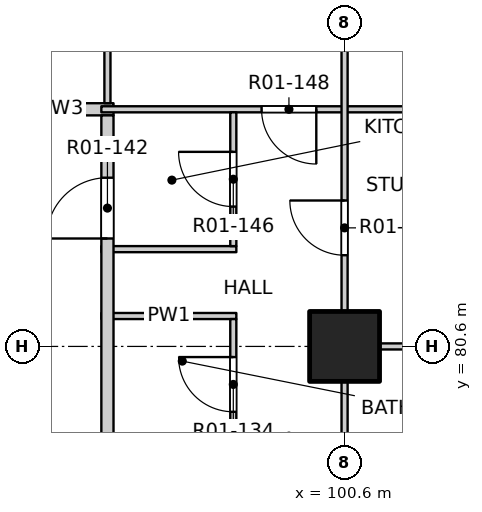
"""IFC4 building model, lengths in metres.
Left out: names, types, materials, properties, quantities, classifications, styles, units other than length and angle.
Written with IfcOpenShell. Run it as: python <this file> out.ifc"""

import sys

from ifc_helpers import new_model, si_unit, direction, frame, frame_2d, origin, origin_2d, place, context, subcontext, project, spatial, rectangle, extrude, element, fill, save


model = new_model("IFC4")
c1 = context("Model", 3, precision=1e-05, world=origin(), true_north=direction((0.0, 1.0)))
c2 = subcontext(c1, "Body", "Model", "MODEL_VIEW")
j1 = project(units=[si_unit("LENGTHUNIT", "METRE"), si_unit("PLANEANGLEUNIT", "RADIAN")], contexts=[c1])
p1 = place(None, origin())
s1 = spatial("IfcSite", under=j1, at=p1, CompositionType="ELEMENT")
p2 = place(p1, origin())
s2 = spatial("IfcBuilding", under=s1, at=p2, CompositionType="ELEMENT")
p3 = place(p2, frame((0.0, 0.0, 26.3)))
s3 = spatial("IfcBuildingStorey", under=s2, at=p3, CompositionType="ELEMENT", Elevation=26.3)
p4 = place(p3, frame((100.6, 80.6, -0.25), z_axis=(0.0, 0.0, 1.0), x_axis=(1.0, 0.0, 0.0)))
e1 = element("IfcColumn", 1, at=p4, inside=s3, PredefinedType="COLUMN", context=c2, shape_type="SweptSolid", body=[
    extrude(rectangle(XDim=1.15, YDim=1.15, at=origin_2d()), origin(), (0.0, 0.0, 1.0), 3.4),
])
p5 = place(p3, frame((100.55, 80.6, 0.0), z_axis=(0.0, 0.0, 1.0), x_axis=(1.0, 0.0, 0.0)))
e2 = element("IfcWall", 2, at=p5, inside=s3, PredefinedType="PARTITIONING", context=c2, shape_type="SweptSolid", body=[
    extrude(rectangle(XDim=7.55, YDim=0.1, at=frame_2d((3.775, 0.0))), origin(), (0.0, 0.0, 1.0), 2.55),
])
for number, where, z_axis, x_axis in (
    (3, (96.6, 81.1, 0.0), (0.0, 0.0, 1.0), (1.0, 0.0, 0.0)),
    (4, (96.6, 82.2, 0.0), (0.0, 0.0, 1.0), (1.0, 0.0, 0.0)),
):
    element("IfcWall", number, at=place(p3, frame(where, z_axis=z_axis, x_axis=x_axis)), inside=s3, PredefinedType="PARTITIONING", context=c2, shape_type="SweptSolid", body=[
        extrude(rectangle(XDim=2.22, YDim=0.1, at=frame_2d((1.11, 0.0))), origin(), (0.0, 0.0, 1.0), 3.15),
    ])
p6 = place(p3, frame((95.1, 84.5, 0.0), z_axis=(0.0, 0.0, 1.0), x_axis=(1.0, 0.0, 0.0)))
e5 = element("IfcWall", 5, at=p6, inside=s3, PredefinedType="PARTITIONING", context=c2, shape_type="SweptSolid", body=[
    extrude(rectangle(XDim=1.7, YDim=0.2, at=frame_2d((0.85, 0.0))), origin(), (0.0, 0.0, 1.0), 3.15),
])
p7 = place(p3, frame((96.6, 84.5, 0.0), z_axis=(0.0, 0.0, 1.0), x_axis=(1.0, 0.0, 0.0)))
e6 = element("IfcWall", 6, at=p7, inside=s3, PredefinedType="PARTITIONING", context=c2, shape_type="SweptSolid", body=[
    extrude(rectangle(XDim=11.5, YDim=0.1, at=frame_2d((5.75, 0.0))), origin(), (0.0, 0.0, 1.0), 3.15),
])
p8 = place(p7, frame((2.635, 0.0, 0.0)))
e7 = element("IfcOpeningElement", 7, at=p8, cuts=e6, PredefinedType="OPENING", context=c2, shape_type="SweptSolid", body=[
    extrude(rectangle(XDim=0.9, YDim=2.1, at=frame_2d((0.45, 1.05))), frame((0.0, 0.06, 0.0), z_axis=(0.0, -1.0, 0.0), x_axis=(1.0, 0.0, 0.0)), (0.0, 0.0, 1.0), 0.12),
])
p9 = place(p3, frame((96.7, 53.4, 0.0), z_axis=(0.0, 0.0, 1.0), x_axis=(0.0, 1.0, 0.0)))
e8 = element("IfcWall", 8, at=p9, inside=s3, PredefinedType="PARTITIONING", context=c2, shape_type="SweptSolid", body=[
    extrude(rectangle(XDim=31.0, YDim=0.2, at=frame_2d((15.5, 0.0))), origin(), (0.0, 0.0, 1.0), 3.15),
])
p10 = place(p9, frame((5.575, 0.0, 0.0)))
e9 = element("IfcOpeningElement", 9, at=p10, cuts=e8, PredefinedType="OPENING", context=c2, shape_type="SweptSolid", body=[
    extrude(rectangle(XDim=1.0, YDim=2.1, at=frame_2d((0.5, 1.05))), frame((0.0, 0.11, 0.0), z_axis=(0.0, -1.0, 0.0), x_axis=(1.0, 0.0, 0.0)), (0.0, 0.0, 1.0), 0.22),
])
p11 = place(p9, frame((10.075, 0.0, 0.0)))
e10 = element("IfcOpeningElement", 10, at=p11, cuts=e8, PredefinedType="OPENING", context=c2, shape_type="SweptSolid", body=[
    extrude(rectangle(XDim=1.0, YDim=2.1, at=frame_2d((0.5, 1.05))), frame((0.0, 0.11, 0.0), z_axis=(0.0, -1.0, 0.0), x_axis=(1.0, 0.0, 0.0)), (0.0, 0.0, 1.0), 0.22),
])
p12 = place(p9, frame((28.975, 0.0, 0.0)))
e11 = element("IfcOpeningElement", 11, at=p12, cuts=e8, PredefinedType="OPENING", context=c2, shape_type="SweptSolid", body=[
    extrude(rectangle(XDim=1.0, YDim=2.1, at=frame_2d((0.5, 1.05))), frame((0.0, 0.11, 0.0), z_axis=(0.0, -1.0, 0.0), x_axis=(1.0, 0.0, 0.0)), (0.0, 0.0, 1.0), 0.22),
])
p13 = place(p3, frame((96.7, 84.6, 0.0), z_axis=(0.0, 0.0, 1.0), x_axis=(0.0, 1.0, 0.0)))
e12 = element("IfcWall", 12, at=p13, inside=s3, PredefinedType="PARTITIONING", context=c2, shape_type="SweptSolid", body=[
    extrude(rectangle(XDim=3.5, YDim=0.1, at=frame_2d((1.75, 0.0))), origin(), (0.0, 0.0, 1.0), 3.15),
])
p14 = place(p13, frame((1.4, 0.0, 0.0)))
e13 = element("IfcOpeningElement", 13, at=p14, cuts=e12, PredefinedType="OPENING", context=c2, shape_type="SweptSolid", body=[
    extrude(rectangle(XDim=0.9, YDim=2.1, at=frame_2d((0.45, 1.05))), frame((0.0, 0.06, 0.0), z_axis=(0.0, -1.0, 0.0), x_axis=(1.0, 0.0, 0.0)), (0.0, 0.0, 1.0), 0.12),
])
p15 = place(p3, frame((98.77, 63.35, 0.0), z_axis=(0.0, 0.0, 1.0), x_axis=(0.0, 1.0, 0.0)))
e14 = element("IfcWall", 14, at=p15, inside=s3, PredefinedType="PARTITIONING", context=c2, shape_type="SweptSolid", body=[
    extrude(rectangle(XDim=17.7, YDim=0.1, at=frame_2d((8.85, 0.0))), origin(), (0.0, 0.0, 1.0), 3.15),
])
p16 = place(p15, frame((1.0, 0.0, 0.0)))
e15 = element("IfcOpeningElement", 15, at=p16, cuts=e14, PredefinedType="OPENING", context=c2, shape_type="SweptSolid", body=[
    extrude(rectangle(XDim=0.8, YDim=2.1, at=frame_2d((0.4, 1.05))), frame((0.0, 0.06, 0.0), z_axis=(0.0, -1.0, 0.0), x_axis=(1.0, 0.0, 0.0)), (0.0, 0.0, 1.0), 0.12),
])
p17 = place(p15, frame((3.9, 0.0, 0.0)))
e16 = element("IfcOpeningElement", 16, at=p17, cuts=e14, PredefinedType="OPENING", context=c2, shape_type="SweptSolid", body=[
    extrude(rectangle(XDim=0.8, YDim=2.1, at=frame_2d((0.4, 1.05))), frame((0.0, 0.06, 0.0), z_axis=(0.0, -1.0, 0.0), x_axis=(1.0, 0.0, 0.0)), (0.0, 0.0, 1.0), 0.12),
])
p18 = place(p15, frame((6.5, 0.0, 0.0)))
e17 = element("IfcOpeningElement", 17, at=p18, cuts=e14, PredefinedType="OPENING", context=c2, shape_type="SweptSolid", body=[
    extrude(rectangle(XDim=0.9, YDim=2.1, at=frame_2d((0.45, 1.05))), frame((0.0, 0.06, 0.0), z_axis=(0.0, -1.0, 0.0), x_axis=(1.0, 0.0, 0.0)), (0.0, 0.0, 1.0), 0.12),
])
p19 = place(p15, frame((9.385, 0.0, 0.0)))
e18 = element("IfcOpeningElement", 18, at=p19, cuts=e14, PredefinedType="OPENING", context=c2, shape_type="SweptSolid", body=[
    extrude(rectangle(XDim=0.9, YDim=2.1, at=frame_2d((0.45, 1.05))), frame((0.0, 0.06, 0.0), z_axis=(0.0, -1.0, 0.0), x_axis=(1.0, 0.0, 0.0)), (0.0, 0.0, 1.0), 0.12),
])
p20 = place(p15, frame((11.985, 0.0, 0.0)))
e19 = element("IfcOpeningElement", 19, at=p20, cuts=e14, PredefinedType="OPENING", context=c2, shape_type="SweptSolid", body=[
    extrude(rectangle(XDim=0.9, YDim=2.1, at=frame_2d((0.45, 1.05))), frame((0.0, 0.06, 0.0), z_axis=(0.0, -1.0, 0.0), x_axis=(1.0, 0.0, 0.0)), (0.0, 0.0, 1.0), 0.12),
])
p21 = place(p15, frame((14.025, 0.0, 0.0)))
e20 = element("IfcOpeningElement", 20, at=p21, cuts=e14, PredefinedType="OPENING", context=c2, shape_type="SweptSolid", body=[
    extrude(rectangle(XDim=0.8, YDim=2.1, at=frame_2d((0.4, 1.05))), frame((0.0, 0.06, 0.0), z_axis=(0.0, -1.0, 0.0), x_axis=(1.0, 0.0, 0.0)), (0.0, 0.0, 1.0), 0.12),
])
p22 = place(p15, frame((16.175, 0.0, 0.0)))
e21 = element("IfcOpeningElement", 21, at=p22, cuts=e14, PredefinedType="OPENING", context=c2, shape_type="SweptSolid", body=[
    extrude(rectangle(XDim=0.9, YDim=2.1, at=frame_2d((0.45, 1.05))), frame((0.0, 0.06, 0.0), z_axis=(0.0, -1.0, 0.0), x_axis=(1.0, 0.0, 0.0)), (0.0, 0.0, 1.0), 0.12),
])
p23 = place(p3, frame((98.77, 82.25, 0.0), z_axis=(0.0, 0.0, 1.0), x_axis=(0.0, 1.0, 0.0)))
e22 = element("IfcWall", 22, at=p23, inside=s3, PredefinedType="PARTITIONING", context=c2, shape_type="SweptSolid", body=[
    extrude(rectangle(XDim=2.2, YDim=0.1, at=frame_2d((1.1, 0.0))), origin(), (0.0, 0.0, 1.0), 3.15),
])
p24 = place(p23, frame((0.65, 0.0, 0.0)))
e23 = element("IfcOpeningElement", 23, at=p24, cuts=e22, PredefinedType="OPENING", context=c2, shape_type="SweptSolid", body=[
    extrude(rectangle(XDim=0.9, YDim=2.1, at=frame_2d((0.45, 1.05))), frame((0.0, 0.06, 0.0), z_axis=(0.0, -1.0, 0.0), x_axis=(1.0, 0.0, 0.0)), (0.0, 0.0, 1.0), 0.12),
])
p25 = place(p3, frame((100.6, 49.4, 0.0), z_axis=(0.0, 0.0, 1.0), x_axis=(0.0, 1.0, 0.0)))
e24 = element("IfcWall", 24, at=p25, inside=s3, PredefinedType="PARTITIONING", context=c2, shape_type="SweptSolid", body=[
    extrude(rectangle(XDim=31.2, YDim=0.1, at=frame_2d((15.6, 0.0))), origin(), (0.0, 0.0, 1.0), 3.15),
])
p26 = place(p25, frame((1.5, 0.0, 0.0)))
e25 = element("IfcOpeningElement", 25, at=p26, cuts=e24, PredefinedType="OPENING", context=c2, shape_type="SweptSolid", body=[
    extrude(rectangle(XDim=0.9, YDim=2.1, at=frame_2d((0.45, 1.05))), frame((0.0, 0.06, 0.0), z_axis=(0.0, -1.0, 0.0), x_axis=(1.0, 0.0, 0.0)), (0.0, 0.0, 1.0), 0.12),
])
p27 = place(p25, frame((5.4, 0.0, 0.0)))
e26 = element("IfcOpeningElement", 26, at=p27, cuts=e24, PredefinedType="OPENING", context=c2, shape_type="SweptSolid", body=[
    extrude(rectangle(XDim=0.9, YDim=2.1, at=frame_2d((0.45, 1.05))), frame((0.0, 0.06, 0.0), z_axis=(0.0, -1.0, 0.0), x_axis=(1.0, 0.0, 0.0)), (0.0, 0.0, 1.0), 0.12),
])
p28 = place(p25, frame((10.275, 0.0, 0.0)))
e27 = element("IfcOpeningElement", 27, at=p28, cuts=e24, PredefinedType="OPENING", context=c2, shape_type="SweptSolid", body=[
    extrude(rectangle(XDim=0.9, YDim=2.1, at=frame_2d((0.45, 1.05))), frame((0.0, 0.06, 0.0), z_axis=(0.0, -1.0, 0.0), x_axis=(1.0, 0.0, 0.0)), (0.0, 0.0, 1.0), 0.12),
])
p29 = place(p25, frame((14.0, 0.0, 0.0)))
e28 = element("IfcOpeningElement", 28, at=p29, cuts=e24, PredefinedType="OPENING", context=c2, shape_type="SweptSolid", body=[
    extrude(rectangle(XDim=0.9, YDim=2.1, at=frame_2d((0.45, 1.05))), frame((0.0, 0.06, 0.0), z_axis=(0.0, -1.0, 0.0), x_axis=(1.0, 0.0, 0.0)), (0.0, 0.0, 1.0), 0.12),
])
p30 = place(p25, frame((17.1, 0.0, 0.0)))
e29 = element("IfcOpeningElement", 29, at=p30, cuts=e24, PredefinedType="OPENING", context=c2, shape_type="SweptSolid", body=[
    extrude(rectangle(XDim=0.9, YDim=2.1, at=frame_2d((0.45, 1.05))), frame((0.0, 0.06, 0.0), z_axis=(0.0, -1.0, 0.0), x_axis=(1.0, 0.0, 0.0)), (0.0, 0.0, 1.0), 0.12),
])
p31 = place(p25, frame((21.8, 0.0, 0.0)))
e30 = element("IfcOpeningElement", 30, at=p31, cuts=e24, PredefinedType="OPENING", context=c2, shape_type="SweptSolid", body=[
    extrude(rectangle(XDim=0.9, YDim=2.1, at=frame_2d((0.45, 1.05))), frame((0.0, 0.06, 0.0), z_axis=(0.0, -1.0, 0.0), x_axis=(1.0, 0.0, 0.0)), (0.0, 0.0, 1.0), 0.12),
])
p32 = place(p25, frame((24.9, 0.0, 0.0)))
e31 = element("IfcOpeningElement", 31, at=p32, cuts=e24, PredefinedType="OPENING", context=c2, shape_type="SweptSolid", body=[
    extrude(rectangle(XDim=0.9, YDim=2.1, at=frame_2d((0.45, 1.05))), frame((0.0, 0.06, 0.0), z_axis=(0.0, -1.0, 0.0), x_axis=(1.0, 0.0, 0.0)), (0.0, 0.0, 1.0), 0.12),
])
p33 = place(p25, frame((28.8, 0.0, 0.0)))
e32 = element("IfcOpeningElement", 32, at=p33, cuts=e24, PredefinedType="OPENING", context=c2, shape_type="SweptSolid", body=[
    extrude(rectangle(XDim=0.9, YDim=2.1, at=frame_2d((0.45, 1.05))), frame((0.0, 0.06, 0.0), z_axis=(0.0, -1.0, 0.0), x_axis=(1.0, 0.0, 0.0)), (0.0, 0.0, 1.0), 0.12),
])
p34 = place(p3, frame((100.6, 80.6, 0.0), z_axis=(0.0, 0.0, 1.0), x_axis=(0.0, 1.0, 0.0)))
e33 = element("IfcWall", 33, at=p34, inside=s3, PredefinedType="PARTITIONING", context=c2, shape_type="SweptSolid", body=[
    extrude(rectangle(XDim=7.5, YDim=0.1, at=frame_2d((3.75, 0.0))), origin(), (0.0, 0.0, 1.0), 2.55),
])
p35 = place(p34, frame((1.5, 0.0, 0.0)))
e34 = element("IfcOpeningElement", 34, at=p35, cuts=e33, PredefinedType="OPENING", context=c2, shape_type="SweptSolid", body=[
    extrude(rectangle(XDim=0.9, YDim=2.1, at=frame_2d((0.45, 1.05))), frame((0.0, 0.06, 0.0), z_axis=(0.0, -1.0, 0.0), x_axis=(1.0, 0.0, 0.0)), (0.0, 0.0, 1.0), 0.12),
])
p36 = place(p34, frame((5.4, 0.0, 0.0)))
e35 = element("IfcOpeningElement", 35, at=p36, cuts=e33, PredefinedType="OPENING", context=c2, shape_type="SweptSolid", body=[
    extrude(rectangle(XDim=0.9, YDim=2.1, at=frame_2d((0.45, 1.05))), frame((0.0, 0.06, 0.0), z_axis=(0.0, -1.0, 0.0), x_axis=(1.0, 0.0, 0.0)), (0.0, 0.0, 1.0), 0.12),
])
p37 = place(p22, origin())
e36 = element("IfcDoor", 36, at=p37, inside=s3, OperationType="SINGLE_SWING_RIGHT", PredefinedType="DOOR", context=c2, shape_type="SweptSolid", body=[
    extrude(rectangle(XDim=0.9, YDim=2.1, at=frame_2d((0.45, 1.05))), frame((0.0, 0.025, 0.0), z_axis=(0.0, -1.0, 0.0), x_axis=(1.0, 0.0, 0.0)), (0.0, 0.0, 1.0), 0.05),
])
fill(e21, e36)
p38 = place(p35, origin())
e37 = element("IfcDoor", 37, at=p38, inside=s3, OperationType="SINGLE_SWING_RIGHT", PredefinedType="DOOR", context=c2, shape_type="SweptSolid", body=[
    extrude(rectangle(XDim=0.9, YDim=2.1, at=frame_2d((0.45, 1.05))), frame((0.0, 0.025, 0.0), z_axis=(0.0, -1.0, 0.0), x_axis=(1.0, 0.0, 0.0)), (0.0, 0.0, 1.0), 0.05),
])
fill(e34, e37)
p39 = place(p12, origin())
e38 = element("IfcDoor", 38, at=p39, inside=s3, OperationType="SINGLE_SWING_LEFT", PredefinedType="DOOR", context=c2, shape_type="SweptSolid", body=[
    extrude(rectangle(XDim=1.0, YDim=2.1, at=frame_2d((0.5, 1.05))), frame((0.0, 0.025, 0.0), z_axis=(0.0, -1.0, 0.0), x_axis=(1.0, 0.0, 0.0)), (0.0, 0.0, 1.0), 0.05),
])
fill(e11, e38)
p40 = place(p24, origin())
e39 = element("IfcDoor", 39, at=p40, inside=s3, OperationType="SINGLE_SWING_RIGHT", PredefinedType="DOOR", context=c2, shape_type="SweptSolid", body=[
    extrude(rectangle(XDim=0.9, YDim=2.1, at=frame_2d((0.45, 1.05))), frame((0.0, 0.025, 0.0), z_axis=(0.0, -1.0, 0.0), x_axis=(1.0, 0.0, 0.0)), (0.0, 0.0, 1.0), 0.05),
])
fill(e23, e39)
p41 = place(p8, origin())
e40 = element("IfcDoor", 40, at=p41, inside=s3, OperationType="SINGLE_SWING_LEFT", PredefinedType="DOOR", context=c2, shape_type="SweptSolid", body=[
    extrude(rectangle(XDim=0.9, YDim=2.1, at=frame_2d((0.45, 1.05))), frame((0.0, 0.025, 0.0), z_axis=(0.0, -1.0, 0.0), x_axis=(1.0, 0.0, 0.0)), (0.0, 0.0, 1.0), 0.05),
])
fill(e7, e40)
save(model, sys.argv[1])
